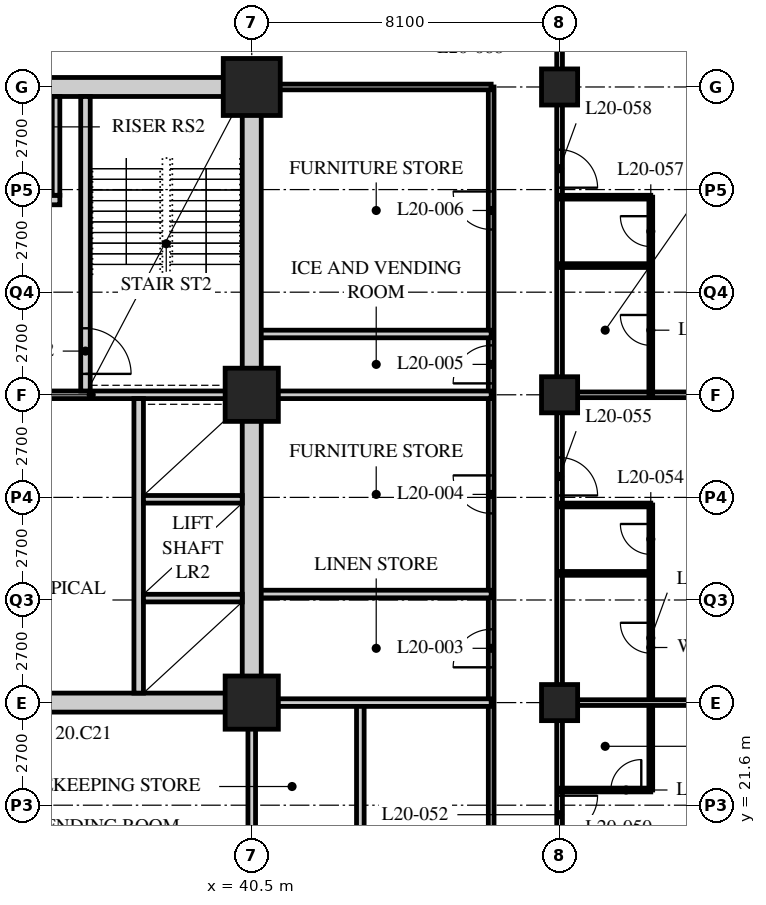
"""IFC4 building model, lengths in metres.
Left out: names, types, materials, properties, quantities, classifications, styles, units other than length and angle.
Written with IfcOpenShell. Run it as: python <this file> out.ifc"""

import sys

from ifc_helpers import new_model, si_unit, direction, frame, frame_2d, origin, origin_2d, place, context, subcontext, project, spatial, rectangle, hollow_rectangle, extrude, element, fill, save


model = new_model("IFC4")
c1 = context("Model", 3, precision=1e-05, world=origin(), true_north=direction((0.0, 1.0)))
c2 = subcontext(c1, "Body", "Model", "MODEL_VIEW")
j1 = project(units=[si_unit("LENGTHUNIT", "METRE"), si_unit("PLANEANGLEUNIT", "RADIAN")], contexts=[c1])
p1 = place(None, origin())
s1 = spatial("IfcSite", under=j1, at=p1, CompositionType="ELEMENT")
p2 = place(p1, origin())
s2 = spatial("IfcBuilding", under=s1, at=p2, CompositionType="ELEMENT")
p3 = place(p2, frame((0.0, 0.0, 80.6)))
s3 = spatial("IfcBuildingStorey", under=s2, at=p3, CompositionType="ELEMENT", Elevation=80.6)
for number, where, z_axis, x_axis in (
    (1, (40.5, 24.3, 0.0), (0.0, 0.0, 1.0), (1.0, 0.0, 0.0)),
    (2, (40.5, 32.4, 0.0), (0.0, 0.0, 1.0), (1.0, 0.0, 0.0)),
):
    element("IfcColumn", number, at=place(p3, frame(where, z_axis=z_axis, x_axis=x_axis)), inside=s3, PredefinedType="COLUMN", context=c2, shape_type="SweptSolid", body=[
        extrude(hollow_rectangle(XDim=1.4, YDim=1.4, WallThickness=0.12, at=origin_2d()), origin(), (0.0, 0.0, 1.0), 3.4),
    ])
p4 = place(p3, frame((40.5, 40.5, 0.0), z_axis=(0.0, 0.0, 1.0), x_axis=(1.0, 0.0, 0.0)))
e3 = element("IfcColumn", 3, at=p4, inside=s3, PredefinedType="COLUMN", context=c2, shape_type="SweptSolid", body=[
    extrude(hollow_rectangle(XDim=1.5, YDim=1.5, WallThickness=0.13, at=origin_2d()), origin(), (0.0, 0.0, 1.0), 3.4),
])
for number, where, z_axis, x_axis in (
    (4, (48.6, 24.3, 0.0), (0.0, 0.0, 1.0), (1.0, 0.0, 0.0)),
    (5, (48.6, 32.4, 0.0), (0.0, 0.0, 1.0), (1.0, 0.0, 0.0)),
    (6, (48.6, 40.5, 0.0), (0.0, 0.0, 1.0), (1.0, 0.0, 0.0)),
):
    element("IfcColumn", number, at=place(p3, frame(where, z_axis=z_axis, x_axis=x_axis)), inside=s3, PredefinedType="COLUMN", context=c2, shape_type="SweptSolid", body=[
        extrude(hollow_rectangle(XDim=0.95, YDim=0.95, WallThickness=0.095, at=origin_2d()), origin(), (0.0, 0.0, 1.0), 3.4),
    ])
p5 = place(p3, frame((48.6, 16.2, 0.0), z_axis=(0.0, 0.0, 1.0), x_axis=(0.0, 1.0, 0.0)))
e7 = element("IfcWall", 7, at=p5, inside=s3, PredefinedType="PARTITIONING", context=c2, shape_type="SweptSolid", body=[
    extrude(rectangle(XDim=26.1, YDim=0.15, at=frame_2d((13.05, 0.0))), origin(), (0.0, 0.0, 1.0), 2.428),
])
p6 = place(p5, frame((2.75, 0.0, 0.0)))
e8 = element("IfcOpeningElement", 8, at=p6, cuts=e7, PredefinedType="OPENING", context=c2, shape_type="SweptSolid", body=[
    extrude(rectangle(XDim=1.0, YDim=2.1, at=frame_2d((0.5, 1.05))), frame((0.0, 0.085, 0.0), z_axis=(0.0, -1.0, 0.0), x_axis=(1.0, 0.0, 0.0)), (0.0, 0.0, 1.0), 0.17),
])
p7 = place(p5, frame((4.65, 0.0, 0.0)))
e9 = element("IfcOpeningElement", 9, at=p7, cuts=e7, PredefinedType="OPENING", context=c2, shape_type="SweptSolid", body=[
    extrude(rectangle(XDim=1.0, YDim=2.1, at=frame_2d((0.5, 1.05))), frame((0.0, 0.085, 0.0), z_axis=(0.0, -1.0, 0.0), x_axis=(1.0, 0.0, 0.0)), (0.0, 0.0, 1.0), 0.17),
])
p8 = place(p5, frame((13.55, 0.0, 0.0)))
e10 = element("IfcOpeningElement", 10, at=p8, cuts=e7, PredefinedType="OPENING", context=c2, shape_type="SweptSolid", body=[
    extrude(rectangle(XDim=1.0, YDim=2.1, at=frame_2d((0.5, 1.05))), frame((0.0, 0.085, 0.0), z_axis=(0.0, -1.0, 0.0), x_axis=(1.0, 0.0, 0.0)), (0.0, 0.0, 1.0), 0.17),
])
p9 = place(p5, frame((21.65, 0.0, 0.0)))
e11 = element("IfcOpeningElement", 11, at=p9, cuts=e7, PredefinedType="OPENING", context=c2, shape_type="SweptSolid", body=[
    extrude(rectangle(XDim=1.0, YDim=2.1, at=frame_2d((0.5, 1.05))), frame((0.0, 0.085, 0.0), z_axis=(0.0, -1.0, 0.0), x_axis=(1.0, 0.0, 0.0)), (0.0, 0.0, 1.0), 0.17),
])
p10 = place(p3, frame((46.8, 18.0, 0.0), z_axis=(0.0, 0.0, 1.0), x_axis=(0.0, 1.0, 0.0)))
e12 = element("IfcWall", 12, at=p10, inside=s3, PredefinedType="PARTITIONING", context=c2, shape_type="SweptSolid", body=[
    extrude(rectangle(XDim=22.5, YDim=0.15, at=frame_2d((11.25, 0.0))), origin(), (0.0, 0.0, 1.0), 3.19),
])
p11 = place(p10, frame((7.229, 0.0, 0.0)))
e13 = element("IfcOpeningElement", 13, at=p11, cuts=e12, PredefinedType="OPENING", context=c2, shape_type="SweptSolid", body=[
    extrude(rectangle(XDim=1.0, YDim=2.1, at=frame_2d((0.5, 1.05))), frame((0.0, 0.085, 0.0), z_axis=(0.0, -1.0, 0.0), x_axis=(1.0, 0.0, 0.0)), (0.0, 0.0, 1.0), 0.17),
])
p12 = place(p10, frame((11.279, 0.0, 0.0)))
e14 = element("IfcOpeningElement", 14, at=p12, cuts=e12, PredefinedType="OPENING", context=c2, shape_type="SweptSolid", body=[
    extrude(rectangle(XDim=1.0, YDim=2.1, at=frame_2d((0.5, 1.05))), frame((0.0, 0.085, 0.0), z_axis=(0.0, -1.0, 0.0), x_axis=(1.0, 0.0, 0.0)), (0.0, 0.0, 1.0), 0.17),
])
p13 = place(p10, frame((14.7, 0.0, 0.0)))
e15 = element("IfcOpeningElement", 15, at=p13, cuts=e12, PredefinedType="OPENING", context=c2, shape_type="SweptSolid", body=[
    extrude(rectangle(XDim=1.0, YDim=2.1, at=frame_2d((0.5, 1.05))), frame((0.0, 0.085, 0.0), z_axis=(0.0, -1.0, 0.0), x_axis=(1.0, 0.0, 0.0)), (0.0, 0.0, 1.0), 0.17),
])
p14 = place(p10, frame((18.75, 0.0, 0.0)))
e16 = element("IfcOpeningElement", 16, at=p14, cuts=e12, PredefinedType="OPENING", context=c2, shape_type="SweptSolid", body=[
    extrude(rectangle(XDim=1.0, YDim=2.1, at=frame_2d((0.5, 1.05))), frame((0.0, 0.085, 0.0), z_axis=(0.0, -1.0, 0.0), x_axis=(1.0, 0.0, 0.0)), (0.0, 0.0, 1.0), 0.17),
])
p15 = place(p3, frame((46.8, 40.5, 0.0), z_axis=(0.0, 0.0, 1.0), x_axis=(-1.0, 0.0, 0.0)))
e17 = element("IfcWall", 17, at=p15, inside=s3, PredefinedType="PARTITIONING", context=c2, shape_type="SweptSolid", body=[
    extrude(rectangle(XDim=6.1, YDim=0.15, at=frame_2d((3.05, 0.0))), origin(), (0.0, 0.0, 1.0), 2.428),
])
p16 = place(p3, frame((40.5, 32.4, 0.0), z_axis=(0.0, 0.0, 1.0), x_axis=(1.0, 0.0, 0.0)))
e18 = element("IfcWall", 18, at=p16, inside=s3, PredefinedType="SOLIDWALL", context=c2, shape_type="SweptSolid", body=[
    extrude(rectangle(XDim=6.3, YDim=0.2, at=frame_2d((3.15, 0.0))), origin(), (0.0, 0.0, 1.0), 2.428),
])
for number, where, z_axis, x_axis in (
    (19, (46.8, 27.157, 0.0), (0.0, 0.0, 1.0), (-1.0, 0.0, 0.0)),
    (20, (46.8, 34.0, 0.0), (0.0, 0.0, 1.0), (-1.0, 0.0, 0.0)),
):
    element("IfcWall", number, at=place(p3, frame(where, z_axis=z_axis, x_axis=x_axis)), inside=s3, PredefinedType="SOLIDWALL", context=c2, shape_type="SweptSolid", body=[
        extrude(rectangle(XDim=6.3, YDim=0.2, at=frame_2d((3.15, 0.0))), origin(), (0.0, 0.0, 1.0), 3.19),
    ])
p17 = place(p3, frame((40.5, 18.0, 0.0), z_axis=(0.0, 0.0, 1.0), x_axis=(0.0, 1.0, 0.0)))
e21 = element("IfcWall", 21, at=p17, inside=s3, PredefinedType="SOLIDWALL", context=c2, shape_type="SweptSolid", body=[
    extrude(rectangle(XDim=6.3, YDim=0.2, at=frame_2d((3.15, 0.0))), origin(), (0.0, 0.0, 1.0), 2.428),
])
p18 = place(p3, frame((43.357, 18.0, 0.0), z_axis=(0.0, 0.0, 1.0), x_axis=(0.0, 1.0, 0.0)))
e22 = element("IfcWall", 22, at=p18, inside=s3, PredefinedType="SOLIDWALL", context=c2, shape_type="SweptSolid", body=[
    extrude(rectangle(XDim=6.3, YDim=0.2, at=frame_2d((3.15, 0.0))), origin(), (0.0, 0.0, 1.0), 3.19),
])
p19 = place(p3, frame((40.5, 24.3, 0.0), z_axis=(0.0, 0.0, 1.0), x_axis=(1.0, 0.0, 0.0)))
e23 = element("IfcWall", 23, at=p19, inside=s3, PredefinedType="SOLIDWALL", context=c2, shape_type="SweptSolid", body=[
    extrude(rectangle(XDim=6.3, YDim=0.2, at=frame_2d((3.15, 0.0))), origin(), (0.0, 0.0, 1.0), 2.428),
])
p20 = place(p3, frame((51.0, 22.0, 0.0), z_axis=(0.0, 0.0, 1.0), x_axis=(0.0, 1.0, 0.0)))
e24 = element("IfcWall", 24, at=p20, inside=s3, PredefinedType="PARTITIONING", context=c2, shape_type="SweptSolid", body=[
    extrude(rectangle(XDim=7.5, YDim=0.1, at=frame_2d((3.75, 0.0))), origin(), (0.0, 0.0, 1.0), 3.19),
])
p21 = place(p20, frame((3.6, 0.0, 0.0)))
e25 = element("IfcOpeningElement", 25, at=p21, cuts=e24, PredefinedType="OPENING", context=c2, shape_type="SweptSolid", body=[
    extrude(rectangle(XDim=0.8, YDim=2.1, at=frame_2d((0.4, 1.05))), frame((0.0, 0.06, 0.0), z_axis=(0.0, -1.0, 0.0), x_axis=(1.0, 0.0, 0.0)), (0.0, 0.0, 1.0), 0.12),
])
p22 = place(p20, frame((6.2, 0.0, 0.0)))
e26 = element("IfcOpeningElement", 26, at=p22, cuts=e24, PredefinedType="OPENING", context=c2, shape_type="SweptSolid", body=[
    extrude(rectangle(XDim=0.8, YDim=2.1, at=frame_2d((0.4, 1.05))), frame((0.0, 0.06, 0.0), z_axis=(0.0, -1.0, 0.0), x_axis=(1.0, 0.0, 0.0)), (0.0, 0.0, 1.0), 0.12),
])
p23 = place(p3, frame((48.6, 22.0, 0.0), z_axis=(0.0, 0.0, 1.0), x_axis=(1.0, 0.0, 0.0)))
e27 = element("IfcWall", 27, at=p23, inside=s3, PredefinedType="PARTITIONING", context=c2, shape_type="SweptSolid", body=[
    extrude(rectangle(XDim=2.4, YDim=0.1, at=frame_2d((1.2, 0.0))), origin(), (0.0, 0.0, 1.0), 3.19),
])
p24 = place(p23, frame((1.35, 0.0, 0.0)))
e28 = element("IfcOpeningElement", 28, at=p24, cuts=e27, PredefinedType="OPENING", context=c2, shape_type="SweptSolid", body=[
    extrude(rectangle(XDim=0.8, YDim=2.1, at=frame_2d((0.4, 1.05))), frame((0.0, 0.06, 0.0), z_axis=(0.0, -1.0, 0.0), x_axis=(1.0, 0.0, 0.0)), (0.0, 0.0, 1.0), 0.12),
])
p25 = place(p3, frame((48.6, 24.3, 0.0), z_axis=(0.0, 0.0, 1.0), x_axis=(1.0, 0.0, 0.0)))
e29 = element("IfcWall", 29, at=p25, inside=s3, PredefinedType="PARTITIONING", context=c2, shape_type="SweptSolid", body=[
    extrude(rectangle(XDim=7.8, YDim=0.15, at=frame_2d((3.9, 0.0))), origin(), (0.0, 0.0, 1.0), 2.428),
])
for number, where, z_axis, x_axis in (
    (30, (48.6, 27.7, 0.0), (0.0, 0.0, 1.0), (1.0, 0.0, 0.0)),
    (31, (48.6, 29.5, 0.0), (0.0, 0.0, 1.0), (1.0, 0.0, 0.0)),
):
    element("IfcWall", number, at=place(p3, frame(where, z_axis=z_axis, x_axis=x_axis)), inside=s3, PredefinedType="PARTITIONING", context=c2, shape_type="SweptSolid", body=[
        extrude(rectangle(XDim=2.4, YDim=0.1, at=frame_2d((1.2, 0.0))), origin(), (0.0, 0.0, 1.0), 3.19),
    ])
p26 = place(p3, frame((48.6, 32.4, 0.0), z_axis=(0.0, 0.0, 1.0), x_axis=(1.0, 0.0, 0.0)))
e32 = element("IfcWall", 32, at=p26, inside=s3, PredefinedType="PARTITIONING", context=c2, shape_type="SweptSolid", body=[
    extrude(rectangle(XDim=7.8, YDim=0.15, at=frame_2d((3.9, 0.0))), origin(), (0.0, 0.0, 1.0), 2.428),
])
p27 = place(p3, frame((51.0, 32.4, 0.0), z_axis=(0.0, 0.0, 1.0), x_axis=(0.0, 1.0, 0.0)))
e33 = element("IfcWall", 33, at=p27, inside=s3, PredefinedType="PARTITIONING", context=c2, shape_type="SweptSolid", body=[
    extrude(rectangle(XDim=5.2, YDim=0.1, at=frame_2d((2.6, 0.0))), origin(), (0.0, 0.0, 1.0), 3.19),
])
p28 = place(p27, frame((1.3, 0.0, 0.0)))
e34 = element("IfcOpeningElement", 34, at=p28, cuts=e33, PredefinedType="OPENING", context=c2, shape_type="SweptSolid", body=[
    extrude(rectangle(XDim=0.8, YDim=2.1, at=frame_2d((0.4, 1.05))), frame((0.0, 0.06, 0.0), z_axis=(0.0, -1.0, 0.0), x_axis=(1.0, 0.0, 0.0)), (0.0, 0.0, 1.0), 0.12),
])
p29 = place(p27, frame((3.9, 0.0, 0.0)))
e35 = element("IfcOpeningElement", 35, at=p29, cuts=e33, PredefinedType="OPENING", context=c2, shape_type="SweptSolid", body=[
    extrude(rectangle(XDim=0.8, YDim=2.1, at=frame_2d((0.4, 1.05))), frame((0.0, 0.06, 0.0), z_axis=(0.0, -1.0, 0.0), x_axis=(1.0, 0.0, 0.0)), (0.0, 0.0, 1.0), 0.12),
])
for number, where, z_axis, x_axis in (
    (36, (48.6, 35.8, 0.0), (0.0, 0.0, 1.0), (1.0, 0.0, 0.0)),
    (37, (48.6, 37.6, 0.0), (0.0, 0.0, 1.0), (1.0, 0.0, 0.0)),
):
    element("IfcWall", number, at=place(p3, frame(where, z_axis=z_axis, x_axis=x_axis)), inside=s3, PredefinedType="PARTITIONING", context=c2, shape_type="SweptSolid", body=[
        extrude(rectangle(XDim=2.4, YDim=0.1, at=frame_2d((1.2, 0.0))), origin(), (0.0, 0.0, 1.0), 3.19),
    ])
p30 = place(p3, frame((15.95, 24.3, 0.0), z_axis=(0.0, 0.0, 1.0), x_axis=(1.0, 0.0, 0.0)))
e38 = element("IfcWall", 38, at=p30, inside=s3, PredefinedType="SOLIDWALL", context=c2, shape_type="SweptSolid", body=[
    extrude(rectangle(XDim=24.8, YDim=0.5, at=frame_2d((12.4, 0.0))), origin(), (0.0, 0.0, 1.0), 2.428),
])
p31 = place(p30, frame((11.5, 0.0, 0.0)))
e39 = element("IfcOpeningElement", 39, at=p31, cuts=e38, PredefinedType="OPENING", context=c2, shape_type="SweptSolid", body=[
    extrude(rectangle(XDim=1.8, YDim=2.4, at=frame_2d((0.9, 1.2))), frame((0.0, 0.26, 0.0), z_axis=(0.0, -1.0, 0.0), x_axis=(1.0, 0.0, 0.0)), (0.0, 0.0, 1.0), 0.52),
])
p32 = place(p3, frame((15.95, 40.5, 0.0), z_axis=(0.0, 0.0, 1.0), x_axis=(1.0, 0.0, 0.0)))
e40 = element("IfcWall", 40, at=p32, inside=s3, PredefinedType="SOLIDWALL", context=c2, shape_type="SweptSolid", body=[
    extrude(rectangle(XDim=24.8, YDim=0.5, at=frame_2d((12.4, 0.0))), origin(), (0.0, 0.0, 1.0), 2.428),
])
p33 = place(p32, frame((11.5, 0.0, 0.0)))
e41 = element("IfcOpeningElement", 41, at=p33, cuts=e40, PredefinedType="OPENING", context=c2, shape_type="SweptSolid", body=[
    extrude(rectangle(XDim=1.8, YDim=2.4, at=frame_2d((0.9, 1.2))), frame((0.0, 0.26, 0.0), z_axis=(0.0, -1.0, 0.0), x_axis=(1.0, 0.0, 0.0)), (0.0, 0.0, 1.0), 0.52),
])
p34 = place(p3, frame((40.5, 24.55, 0.0), z_axis=(0.0, 0.0, 1.0), x_axis=(0.0, 1.0, 0.0)))
e42 = element("IfcWall", 42, at=p34, inside=s3, PredefinedType="SOLIDWALL", context=c2, shape_type="SweptSolid", body=[
    extrude(rectangle(XDim=15.7, YDim=0.5, at=frame_2d((7.85, 0.0))), origin(), (0.0, 0.0, 1.0), 2.428),
])
p35 = place(p3, frame((32.3, 32.4, 0.0), z_axis=(0.0, 0.0, 1.0), x_axis=(1.0, 0.0, 0.0)))
e43 = element("IfcWall", 43, at=p35, inside=s3, PredefinedType="SOLIDWALL", context=c2, shape_type="SweptSolid", body=[
    extrude(rectangle(XDim=7.95, YDim=0.2, at=frame_2d((3.975, 0.0))), origin(), (0.0, 0.0, 1.0), 2.578),
])
p36 = place(p3, frame((37.525, 24.55, 0.0), z_axis=(0.0, 0.0, 1.0), x_axis=(0.0, 1.0, 0.0)))
e44 = element("IfcWall", 44, at=p36, inside=s3, PredefinedType="SOLIDWALL", context=c2, shape_type="SweptSolid", body=[
    extrude(rectangle(XDim=7.75, YDim=0.25, at=frame_2d((3.875, 0.0))), origin(), (0.0, 0.0, 1.0), 3.19),
])
for number, where, z_axis, x_axis in (
    (45, (37.65, 27.05, 0.0), (0.0, 0.0, 1.0), (1.0, 0.0, 0.0)),
    (46, (37.65, 29.65, 0.0), (0.0, 0.0, 1.0), (1.0, 0.0, 0.0)),
):
    element("IfcWall", number, at=place(p3, frame(where, z_axis=z_axis, x_axis=x_axis)), inside=s3, PredefinedType="SOLIDWALL", context=c2, shape_type="SweptSolid", body=[
        extrude(rectangle(XDim=2.6, YDim=0.2, at=frame_2d((1.3, 0.0))), origin(), (0.0, 0.0, 1.0), 3.19),
    ])
p37 = place(p3, frame((36.125, 32.5, 0.0), z_axis=(0.0, 0.0, 1.0), x_axis=(0.0, 1.0, 0.0)))
e47 = element("IfcWall", 47, at=p37, inside=s3, PredefinedType="SOLIDWALL", context=c2, shape_type="SweptSolid", body=[
    extrude(rectangle(XDim=7.75, YDim=0.25, at=frame_2d((3.875, 0.0))), origin(), (0.0, 0.0, 1.0), 3.19),
])
p38 = place(p37, frame((0.45, 0.0, 0.0)))
e48 = element("IfcOpeningElement", 48, at=p38, cuts=e47, PredefinedType="OPENING", context=c2, shape_type="SweptSolid", body=[
    extrude(rectangle(XDim=1.2, YDim=2.1, at=frame_2d((0.6, 1.05))), frame((0.0, 0.135, 0.0), z_axis=(0.0, -1.0, 0.0), x_axis=(1.0, 0.0, 0.0)), (0.0, 0.0, 1.0), 0.27),
])
p39 = place(p3, frame((32.5, 37.525, 0.0), z_axis=(0.0, 0.0, 1.0), x_axis=(1.0, 0.0, 0.0)))
e49 = element("IfcWall", 49, at=p39, inside=s3, PredefinedType="SOLIDWALL", context=c2, shape_type="SweptSolid", body=[
    extrude(rectangle(XDim=2.95, YDim=0.25, at=frame_2d((1.475, 0.0))), origin(), (0.0, 0.0, 1.0), 3.19),
])
p40 = place(p39, frame((0.9, 0.0, 0.0)))
e50 = element("IfcOpeningElement", 50, at=p40, cuts=e49, PredefinedType="OPENING", context=c2, shape_type="SweptSolid", body=[
    extrude(rectangle(XDim=1.1, YDim=2.4, at=frame_2d((0.55, 1.2))), frame((0.0, 0.135, 0.0), z_axis=(0.0, -1.0, 0.0), x_axis=(1.0, 0.0, 0.0)), (0.0, 0.0, 1.0), 0.27),
])
p41 = place(p3, frame((35.35, 37.65, 0.0), z_axis=(0.0, 0.0, 1.0), x_axis=(0.0, 1.0, 0.0)))
e51 = element("IfcWall", 51, at=p41, inside=s3, PredefinedType="SOLIDWALL", context=c2, shape_type="SweptSolid", body=[
    extrude(rectangle(XDim=2.6, YDim=0.2, at=frame_2d((1.3, 0.0))), origin(), (0.0, 0.0, 1.0), 3.19),
])
p42 = place(p11, origin())
e52 = element("IfcDoor", 52, at=p42, inside=s3, OperationType="SINGLE_SWING_LEFT", PredefinedType="DOOR", context=c2, shape_type="SweptSolid", body=[
    extrude(rectangle(XDim=1.0, YDim=2.1, at=frame_2d((0.5, 1.05))), frame((0.0, 0.025, 0.0), z_axis=(0.0, -1.0, 0.0), x_axis=(1.0, 0.0, 0.0)), (0.0, 0.0, 1.0), 0.05),
])
fill(e13, e52)
p43 = place(p12, origin())
e53 = element("IfcDoor", 53, at=p43, inside=s3, OperationType="SINGLE_SWING_RIGHT", PredefinedType="DOOR", context=c2, shape_type="SweptSolid", body=[
    extrude(rectangle(XDim=1.0, YDim=2.1, at=frame_2d((0.5, 1.05))), frame((0.0, 0.025, 0.0), z_axis=(0.0, -1.0, 0.0), x_axis=(1.0, 0.0, 0.0)), (0.0, 0.0, 1.0), 0.05),
])
fill(e14, e53)
p44 = place(p13, origin())
e54 = element("IfcDoor", 54, at=p44, inside=s3, OperationType="SINGLE_SWING_LEFT", PredefinedType="DOOR", context=c2, shape_type="SweptSolid", body=[
    extrude(rectangle(XDim=1.0, YDim=2.1, at=frame_2d((0.5, 1.05))), frame((0.0, 0.025, 0.0), z_axis=(0.0, -1.0, 0.0), x_axis=(1.0, 0.0, 0.0)), (0.0, 0.0, 1.0), 0.05),
])
fill(e15, e54)
p45 = place(p14, origin())
e55 = element("IfcDoor", 55, at=p45, inside=s3, OperationType="SINGLE_SWING_RIGHT", PredefinedType="DOOR", context=c2, shape_type="SweptSolid", body=[
    extrude(rectangle(XDim=1.0, YDim=2.1, at=frame_2d((0.5, 1.05))), frame((0.0, 0.025, 0.0), z_axis=(0.0, -1.0, 0.0), x_axis=(1.0, 0.0, 0.0)), (0.0, 0.0, 1.0), 0.05),
])
fill(e16, e55)
p46 = place(p24, origin())
e56 = element("IfcDoor", 56, at=p46, inside=s3, OperationType="SINGLE_SWING_RIGHT", PredefinedType="DOOR", context=c2, shape_type="SweptSolid", body=[
    extrude(rectangle(XDim=0.8, YDim=2.1, at=frame_2d((0.4, 1.05))), frame((0.0, 0.025, 0.0), z_axis=(0.0, -1.0, 0.0), x_axis=(1.0, 0.0, 0.0)), (0.0, 0.0, 1.0), 0.05),
])
fill(e28, e56)
p47 = place(p7, origin())
e57 = element("IfcDoor", 57, at=p47, inside=s3, OperationType="SINGLE_SWING_LEFT", PredefinedType="DOOR", context=c2, shape_type="SweptSolid", body=[
    extrude(rectangle(XDim=1.0, YDim=2.1, at=frame_2d((0.5, 1.05))), frame((0.0, 0.025, 0.0), z_axis=(0.0, -1.0, 0.0), x_axis=(1.0, 0.0, 0.0)), (0.0, 0.0, 1.0), 0.05),
])
fill(e9, e57)
p48 = place(p21, origin())
e58 = element("IfcDoor", 58, at=p48, inside=s3, OperationType="SINGLE_SWING_RIGHT", PredefinedType="DOOR", context=c2, shape_type="SweptSolid", body=[
    extrude(rectangle(XDim=0.8, YDim=2.1, at=frame_2d((0.4, 1.05))), frame((0.0, 0.025, 0.0), z_axis=(0.0, -1.0, 0.0), x_axis=(1.0, 0.0, 0.0)), (0.0, 0.0, 1.0), 0.05),
])
fill(e25, e58)
p49 = place(p22, origin())
e59 = element("IfcDoor", 59, at=p49, inside=s3, OperationType="SINGLE_SWING_RIGHT", PredefinedType="DOOR", context=c2, shape_type="SweptSolid", body=[
    extrude(rectangle(XDim=0.8, YDim=2.1, at=frame_2d((0.4, 1.05))), frame((0.0, 0.025, 0.0), z_axis=(0.0, -1.0, 0.0), x_axis=(1.0, 0.0, 0.0)), (0.0, 0.0, 1.0), 0.05),
])
fill(e26, e59)
p50 = place(p8, origin())
e60 = element("IfcDoor", 60, at=p50, inside=s3, OperationType="SINGLE_SWING_RIGHT", PredefinedType="DOOR", context=c2, shape_type="SweptSolid", body=[
    extrude(rectangle(XDim=1.0, YDim=2.1, at=frame_2d((0.5, 1.05))), frame((0.0, 0.025, 0.0), z_axis=(0.0, -1.0, 0.0), x_axis=(1.0, 0.0, 0.0)), (0.0, 0.0, 1.0), 0.05),
])
fill(e10, e60)
p51 = place(p28, origin())
e61 = element("IfcDoor", 61, at=p51, inside=s3, OperationType="SINGLE_SWING_RIGHT", PredefinedType="DOOR", context=c2, shape_type="SweptSolid", body=[
    extrude(rectangle(XDim=0.8, YDim=2.1, at=frame_2d((0.4, 1.05))), frame((0.0, 0.025, 0.0), z_axis=(0.0, -1.0, 0.0), x_axis=(1.0, 0.0, 0.0)), (0.0, 0.0, 1.0), 0.05),
])
fill(e34, e61)
p52 = place(p29, origin())
e62 = element("IfcDoor", 62, at=p52, inside=s3, OperationType="SINGLE_SWING_RIGHT", PredefinedType="DOOR", context=c2, shape_type="SweptSolid", body=[
    extrude(rectangle(XDim=0.8, YDim=2.1, at=frame_2d((0.4, 1.05))), frame((0.0, 0.025, 0.0), z_axis=(0.0, -1.0, 0.0), x_axis=(1.0, 0.0, 0.0)), (0.0, 0.0, 1.0), 0.05),
])
fill(e35, e62)
p53 = place(p9, origin())
e63 = element("IfcDoor", 63, at=p53, inside=s3, OperationType="SINGLE_SWING_RIGHT", PredefinedType="DOOR", context=c2, shape_type="SweptSolid", body=[
    extrude(rectangle(XDim=1.0, YDim=2.1, at=frame_2d((0.5, 1.05))), frame((0.0, 0.025, 0.0), z_axis=(0.0, -1.0, 0.0), x_axis=(1.0, 0.0, 0.0)), (0.0, 0.0, 1.0), 0.05),
])
fill(e11, e63)
p54 = place(p38, origin())
e64 = element("IfcDoor", 64, at=p54, inside=s3, OperationType="SINGLE_SWING_RIGHT", PredefinedType="DOOR", context=c2, shape_type="SweptSolid", body=[
    extrude(rectangle(XDim=1.2, YDim=2.1, at=frame_2d((0.6, 1.05))), frame((0.0, 0.025, 0.0), z_axis=(0.0, -1.0, 0.0), x_axis=(1.0, 0.0, 0.0)), (0.0, 0.0, 1.0), 0.05),
])
fill(e48, e64)
save(model, sys.argv[1])
